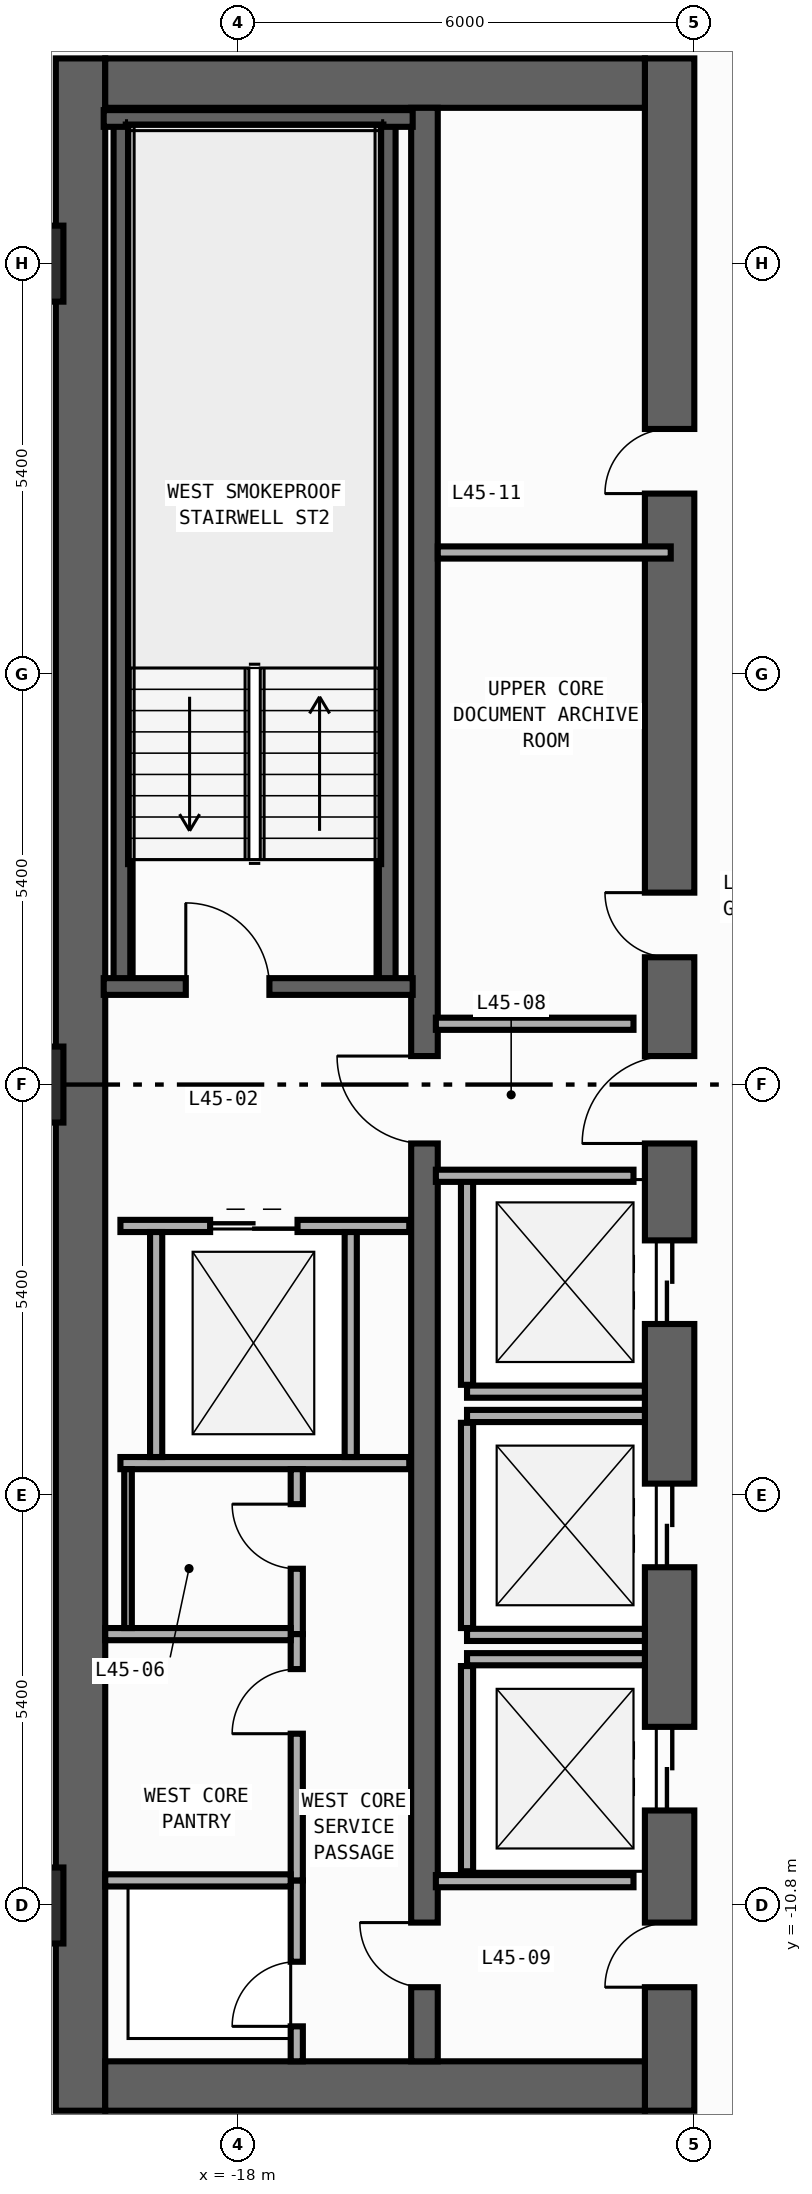
"""IFC4 building model, lengths in metres.
Left out: names, types, materials, properties, quantities, classifications, styles, units other than length and angle.
Written with IfcOpenShell. Run it as: python <this file> out.ifc"""

import sys

from ifc_helpers import new_model, si_unit, direction, frame, frame_2d, origin, origin_2d, place, context, subcontext, project, spatial, rectangle, extrude, element, fill, save


model = new_model("IFC4")
c1 = context("Model", 3, precision=1e-05, world=origin(), true_north=direction((0.0, 1.0)))
c2 = subcontext(c1, "Body", "Model", "MODEL_VIEW")
j1 = project(units=[si_unit("LENGTHUNIT", "METRE"), si_unit("PLANEANGLEUNIT", "RADIAN")], contexts=[c1])
p1 = place(None, origin())
s1 = spatial("IfcSite", under=j1, at=p1, CompositionType="ELEMENT")
p2 = place(p1, origin())
s2 = spatial("IfcBuilding", under=s1, at=p2, CompositionType="ELEMENT")
p3 = place(p2, frame((0.0, 0.0, 195.4)))
s3 = spatial("IfcBuildingStorey", under=s2, at=p3, CompositionType="ELEMENT", Elevation=195.4)
p4 = place(p3, frame((-20.075, -13.5, 0.0), z_axis=(0.0, 0.0, 1.0), x_axis=(0.0, 1.0, 0.0)))
e1 = element("IfcWall", 1, at=p4, inside=s3, PredefinedType="SHEAR", context=c2, shape_type="SweptSolid", body=[
    extrude(rectangle(XDim=27.0, YDim=0.65, at=frame_2d((13.5, 0.0))), origin(), (0.0, 0.0, 1.0), 3.54),
])
p5 = place(p3, frame((-12.325, -13.5, 0.0), z_axis=(0.0, 0.0, 1.0), x_axis=(0.0, 1.0, 0.0)))
e2 = element("IfcWall", 2, at=p5, inside=s3, PredefinedType="SHEAR", context=c2, shape_type="SweptSolid", body=[
    extrude(rectangle(XDim=27.0, YDim=0.65, at=frame_2d((13.5, 0.0))), origin(), (0.0, 0.0, 1.0), 3.54),
])
p6 = place(p5, frame((10.35, 0.0, 0.0)))
e3 = element("IfcOpeningElement", 3, at=p6, cuts=e2, PredefinedType="OPENING", context=c2, shape_type="SweptSolid", body=[
    extrude(rectangle(XDim=1.1, YDim=2.2, at=frame_2d((0.55, 1.1))), frame((0.0, 0.335, 0.0), z_axis=(0.0, -1.0, 0.0), x_axis=(1.0, 0.0, 0.0)), (0.0, 0.0, 1.0), 0.67),
])
p7 = place(p5, frame((7.15, 0.0, 0.0)))
e4 = element("IfcOpeningElement", 4, at=p7, cuts=e2, PredefinedType="OPENING", context=c2, shape_type="SweptSolid", body=[
    extrude(rectangle(XDim=1.1, YDim=2.2, at=frame_2d((0.55, 1.1))), frame((0.0, 0.335, 0.0), z_axis=(0.0, -1.0, 0.0), x_axis=(1.0, 0.0, 0.0)), (0.0, 0.0, 1.0), 0.67),
])
p8 = place(p5, frame((3.95, 0.0, 0.0)))
e5 = element("IfcOpeningElement", 5, at=p8, cuts=e2, PredefinedType="OPENING", context=c2, shape_type="SweptSolid", body=[
    extrude(rectangle(XDim=1.1, YDim=2.2, at=frame_2d((0.55, 1.1))), frame((0.0, 0.335, 0.0), z_axis=(0.0, -1.0, 0.0), x_axis=(1.0, 0.0, 0.0)), (0.0, 0.0, 1.0), 0.67),
])
p9 = place(p5, frame((15.175, 0.0, 0.0)))
e6 = element("IfcOpeningElement", 6, at=p9, cuts=e2, PredefinedType="OPENING", context=c2, shape_type="SweptSolid", body=[
    extrude(rectangle(XDim=0.85, YDim=2.1, at=frame_2d((0.425, 1.05))), frame((0.0, 0.335, 0.0), z_axis=(0.0, -1.0, 0.0), x_axis=(1.0, 0.0, 0.0)), (0.0, 0.0, 1.0), 0.67),
])
p10 = place(p5, frame((21.275, 0.0, 0.0)))
e7 = element("IfcOpeningElement", 7, at=p10, cuts=e2, PredefinedType="OPENING", context=c2, shape_type="SweptSolid", body=[
    extrude(rectangle(XDim=0.85, YDim=2.1, at=frame_2d((0.425, 1.05))), frame((0.0, 0.335, 0.0), z_axis=(0.0, -1.0, 0.0), x_axis=(1.0, 0.0, 0.0)), (0.0, 0.0, 1.0), 0.67),
])
p11 = place(p5, frame((12.725, 0.0, 0.0)))
e8 = element("IfcOpeningElement", 8, at=p11, cuts=e2, PredefinedType="OPENING", context=c2, shape_type="SweptSolid", body=[
    extrude(rectangle(XDim=1.15, YDim=2.2, at=frame_2d((0.575, 1.1))), frame((0.0, 0.335, 0.0), z_axis=(0.0, -1.0, 0.0), x_axis=(1.0, 0.0, 0.0)), (0.0, 0.0, 1.0), 0.67),
])
p12 = place(p5, frame((1.625, 0.0, 0.0)))
e9 = element("IfcOpeningElement", 9, at=p12, cuts=e2, PredefinedType="OPENING", context=c2, shape_type="SweptSolid", body=[
    extrude(rectangle(XDim=0.85, YDim=2.1, at=frame_2d((0.425, 1.05))), frame((0.0, 0.335, 0.0), z_axis=(0.0, -1.0, 0.0), x_axis=(1.0, 0.0, 0.0)), (0.0, 0.0, 1.0), 0.67),
])
for number, where, z_axis, x_axis in (
    (10, (-19.75, -13.175, 0.0), (0.0, 0.0, 1.0), (1.0, 0.0, 0.0)),
    (11, (-19.75, 13.175, 0.0), (0.0, 0.0, 1.0), (1.0, 0.0, 0.0)),
):
    element("IfcWall", number, at=place(p3, frame(where, z_axis=z_axis, x_axis=x_axis)), inside=s3, PredefinedType="SHEAR", context=c2, shape_type="SweptSolid", body=[
        extrude(rectangle(XDim=7.1, YDim=0.65, at=frame_2d((3.55, 0.0))), origin(), (0.0, 0.0, 1.0), 3.54),
    ])
p13 = place(p3, frame((-15.55, -12.85, 0.0), z_axis=(0.0, 0.0, 1.0), x_axis=(0.0, 1.0, 0.0)))
e12 = element("IfcWall", 12, at=p13, inside=s3, PredefinedType="SHEAR", context=c2, shape_type="SweptSolid", body=[
    extrude(rectangle(XDim=25.7, YDim=0.35, at=frame_2d((12.85, 0.0))), origin(), (0.0, 0.0, 1.0), 3.54),
])
p14 = place(p13, frame((12.075, 0.0, 0.0)))
e13 = element("IfcOpeningElement", 13, at=p14, cuts=e12, PredefinedType="OPENING", context=c2, shape_type="SweptSolid", body=[
    extrude(rectangle(XDim=1.15, YDim=2.2, at=frame_2d((0.575, 1.1))), frame((0.0, 0.185, 0.0), z_axis=(0.0, -1.0, 0.0), x_axis=(1.0, 0.0, 0.0)), (0.0, 0.0, 1.0), 0.37),
])
p15 = place(p13, frame((0.975, 0.0, 0.0)))
e14 = element("IfcOpeningElement", 14, at=p15, cuts=e12, PredefinedType="OPENING", context=c2, shape_type="SweptSolid", body=[
    extrude(rectangle(XDim=0.85, YDim=2.1, at=frame_2d((0.425, 1.05))), frame((0.0, 0.185, 0.0), z_axis=(0.0, -1.0, 0.0), x_axis=(1.0, 0.0, 0.0)), (0.0, 0.0, 1.0), 0.37),
])
for number, where, z_axis, x_axis in (
    (15, (-16.04, 1.29, 0.0), (0.0, 0.0, 1.0), (0.0, 1.0, 0.0)),
    (16, (-19.53, 1.29, 0.0), (0.0, 0.0, 1.0), (0.0, 1.0, 0.0)),
):
    element("IfcWall", number, at=place(p3, frame(where, z_axis=z_axis, x_axis=x_axis)), inside=s3, PredefinedType="SHEAR", context=c2, shape_type="SweptSolid", body=[
        extrude(rectangle(XDim=11.42, YDim=0.22, at=frame_2d((5.71, 0.0))), origin(), (0.0, 0.0, 1.0), 3.54),
    ])
p16 = place(p3, frame((-19.77, 12.71, 0.0), z_axis=(0.0, 0.0, 1.0), x_axis=(1.0, 0.0, 0.0)))
e17 = element("IfcWall", 17, at=p16, inside=s3, PredefinedType="SHEAR", context=c2, shape_type="SweptSolid", body=[
    extrude(rectangle(XDim=4.065, YDim=0.22, at=frame_2d((2.032, 0.0))), origin(), (0.0, 0.0, 1.0), 3.54),
])
p17 = place(p3, frame((-19.77, 1.29, 0.0), z_axis=(0.0, 0.0, 1.0), x_axis=(1.0, 0.0, 0.0)))
e18 = element("IfcWall", 18, at=p17, inside=s3, PredefinedType="SHEAR", context=c2, shape_type="SweptSolid", body=[
    extrude(rectangle(XDim=4.065, YDim=0.22, at=frame_2d((2.032, 0.0))), origin(), (0.0, 0.0, 1.0), 3.54),
])
p18 = place(p17, frame((1.08, 0.0, 0.0)))
e19 = element("IfcOpeningElement", 19, at=p18, cuts=e18, PredefinedType="OPENING", context=c2, shape_type="SweptSolid", body=[
    extrude(rectangle(XDim=1.1, YDim=2.2, at=frame_2d((0.55, 1.1))), frame((0.0, 0.12, 0.0), z_axis=(0.0, -1.0, 0.0), x_axis=(1.0, 0.0, 0.0)), (0.0, 0.0, 1.0), 0.24),
])
for number, where, z_axis, x_axis in (
    (20, (-20.8, -10.8, 0.0), (0.0, 0.0, 1.0), (1.0, 0.0, 0.0)),
    (21, (-20.8, 0.0, 0.0), (0.0, 0.0, 1.0), (1.0, 0.0, 0.0)),
    (22, (-20.8, 10.8, 0.0), (0.0, 0.0, 1.0), (1.0, 0.0, 0.0)),
):
    element("IfcColumn", number, at=place(p3, frame(where, z_axis=z_axis, x_axis=x_axis)), inside=s3, PredefinedType="COLUMN", context=c2, shape_type="SweptSolid", body=[
        extrude(rectangle(XDim=1.0, YDim=1.0, at=origin_2d()), origin(), (0.0, 0.0, 1.0), 3.8),
    ])
p19 = place(p3, frame((-14.99, -4.04, 0.0), z_axis=(0.0, 0.0, 1.0), x_axis=(1.0, 0.0, 0.0)))
e23 = element("IfcWall", 23, at=p19, inside=s3, PredefinedType="STANDARD", context=c2, shape_type="SweptSolid", body=[
    extrude(rectangle(XDim=2.34, YDim=0.16, at=frame_2d((1.17, 0.0))), origin(), (0.0, 0.0, 1.0), 3.54),
])
p20 = place(p3, frame((-14.99, -3.95, 0.0), z_axis=(0.0, 0.0, 1.0), x_axis=(0.0, 1.0, 0.0)))
e24 = element("IfcWall", 24, at=p20, inside=s3, PredefinedType="STANDARD", context=c2, shape_type="SweptSolid", body=[
    extrude(rectangle(XDim=2.7, YDim=0.16, at=frame_2d((1.35, 0.0))), origin(), (0.0, 0.0, 1.0), 3.54),
])
for number, where, z_axis, x_axis in (
    (25, (-14.99, -7.24, 0.0), (0.0, 0.0, 1.0), (1.0, 0.0, 0.0)),
    (26, (-14.99, -4.36, 0.0), (0.0, 0.0, 1.0), (1.0, 0.0, 0.0)),
):
    element("IfcWall", number, at=place(p3, frame(where, z_axis=z_axis, x_axis=x_axis)), inside=s3, PredefinedType="STANDARD", context=c2, shape_type="SweptSolid", body=[
        extrude(rectangle(XDim=2.34, YDim=0.16, at=frame_2d((1.17, 0.0))), origin(), (0.0, 0.0, 1.0), 3.54),
    ])
p21 = place(p3, frame((-14.99, -7.15, 0.0), z_axis=(0.0, 0.0, 1.0), x_axis=(0.0, 1.0, 0.0)))
e27 = element("IfcWall", 27, at=p21, inside=s3, PredefinedType="STANDARD", context=c2, shape_type="SweptSolid", body=[
    extrude(rectangle(XDim=2.7, YDim=0.16, at=frame_2d((1.35, 0.0))), origin(), (0.0, 0.0, 1.0), 3.54),
])
p22 = place(p3, frame((-14.99, -7.56, 0.0), z_axis=(0.0, 0.0, 1.0), x_axis=(1.0, 0.0, 0.0)))
e28 = element("IfcWall", 28, at=p22, inside=s3, PredefinedType="STANDARD", context=c2, shape_type="SweptSolid", body=[
    extrude(rectangle(XDim=2.34, YDim=0.16, at=frame_2d((1.17, 0.0))), origin(), (0.0, 0.0, 1.0), 3.54),
])
p23 = place(p3, frame((-14.99, -10.35, 0.0), z_axis=(0.0, 0.0, 1.0), x_axis=(0.0, 1.0, 0.0)))
e29 = element("IfcWall", 29, at=p23, inside=s3, PredefinedType="STANDARD", context=c2, shape_type="SweptSolid", body=[
    extrude(rectangle(XDim=2.7, YDim=0.16, at=frame_2d((1.35, 0.0))), origin(), (0.0, 0.0, 1.0), 3.54),
])
p24 = place(p3, frame((-19.55, -1.86, 0.0), z_axis=(0.0, 0.0, 1.0), x_axis=(1.0, 0.0, 0.0)))
e30 = element("IfcWall", 30, at=p24, inside=s3, PredefinedType="STANDARD", context=c2, shape_type="SweptSolid", body=[
    extrude(rectangle(XDim=3.8, YDim=0.16, at=frame_2d((1.9, 0.0))), origin(), (0.0, 0.0, 1.0), 3.54),
])
p25 = place(p24, frame((1.18, 0.0, 0.0)))
e31 = element("IfcOpeningElement", 31, at=p25, cuts=e30, PredefinedType="OPENING", context=c2, shape_type="SweptSolid", body=[
    extrude(rectangle(XDim=1.15, YDim=2.2, at=frame_2d((0.575, 1.1))), frame((0.0, 0.09, 0.0), z_axis=(0.0, -1.0, 0.0), x_axis=(1.0, 0.0, 0.0)), (0.0, 0.0, 1.0), 0.18),
])
p26 = place(p3, frame((-19.55, -4.98, 0.0), z_axis=(0.0, 0.0, 1.0), x_axis=(1.0, 0.0, 0.0)))
e32 = element("IfcWall", 32, at=p26, inside=s3, PredefinedType="STANDARD", context=c2, shape_type="SweptSolid", body=[
    extrude(rectangle(XDim=3.8, YDim=0.16, at=frame_2d((1.9, 0.0))), origin(), (0.0, 0.0, 1.0), 3.54),
])
for number, where, z_axis, x_axis in (
    (33, (-19.08, -4.9, 0.0), (0.0, 0.0, 1.0), (0.0, 1.0, 0.0)),
    (34, (-16.52, -4.9, 0.0), (0.0, 0.0, 1.0), (0.0, 1.0, 0.0)),
):
    element("IfcWall", number, at=place(p3, frame(where, z_axis=z_axis, x_axis=x_axis)), inside=s3, PredefinedType="STANDARD", context=c2, shape_type="SweptSolid", body=[
        extrude(rectangle(XDim=2.96, YDim=0.16, at=frame_2d((1.48, 0.0))), origin(), (0.0, 0.0, 1.0), 3.54),
    ])
for number, where, z_axis, x_axis in (
    (35, (-15.4, 0.8, 0.0), (0.0, 0.0, 1.0), (1.0, 0.0, 0.0)),
    (36, (-15.4, -1.2, 0.0), (0.0, 0.0, 1.0), (1.0, 0.0, 0.0)),
    (37, (-15.4, -10.48, 0.0), (0.0, 0.0, 1.0), (1.0, 0.0, 0.0)),
):
    element("IfcWall", number, at=place(p3, frame(where, z_axis=z_axis, x_axis=x_axis)), inside=s3, PredefinedType="STANDARD", context=c2, shape_type="SweptSolid", body=[
        extrude(rectangle(XDim=2.6, YDim=0.16, at=frame_2d((1.3, 0.0))), origin(), (0.0, 0.0, 1.0), 3.54),
    ])
p27 = place(p3, frame((-17.23, -12.85, 0.0), z_axis=(0.0, 0.0, 1.0), x_axis=(0.0, 1.0, 0.0)))
e38 = element("IfcWall", 38, at=p27, inside=s3, PredefinedType="PARTITIONING", context=c2, shape_type="SweptSolid", body=[
    extrude(rectangle(XDim=2.38, YDim=0.16, at=frame_2d((1.19, 0.0))), origin(), (0.0, 0.0, 1.0), 3.54),
])
p28 = place(p27, frame((0.46, 0.0, 0.0)))
e39 = element("IfcOpeningElement", 39, at=p28, cuts=e38, PredefinedType="OPENING", context=c2, shape_type="SweptSolid", body=[
    extrude(rectangle(XDim=0.85, YDim=2.1, at=frame_2d((0.425, 1.05))), frame((0.0, 0.09, 0.0), z_axis=(0.0, -1.0, 0.0), x_axis=(1.0, 0.0, 0.0)), (0.0, 0.0, 1.0), 0.18),
])
p29 = place(p3, frame((-17.23, -7.23, 0.0), z_axis=(0.0, 0.0, 1.0), x_axis=(0.0, 1.0, 0.0)))
e40 = element("IfcWall", 40, at=p29, inside=s3, PredefinedType="PARTITIONING", context=c2, shape_type="SweptSolid", body=[
    extrude(rectangle(XDim=2.17, YDim=0.16, at=frame_2d((1.085, 0.0))), origin(), (0.0, 0.0, 1.0), 3.54),
])
p30 = place(p29, frame((0.86, 0.0, 0.0)))
e41 = element("IfcOpeningElement", 41, at=p30, cuts=e40, PredefinedType="OPENING", context=c2, shape_type="SweptSolid", body=[
    extrude(rectangle(XDim=0.85, YDim=2.1, at=frame_2d((0.425, 1.05))), frame((0.0, 0.09, 0.0), z_axis=(0.0, -1.0, 0.0), x_axis=(1.0, 0.0, 0.0)), (0.0, 0.0, 1.0), 0.18),
])
p31 = place(p3, frame((-17.23, -10.47, 0.0), z_axis=(0.0, 0.0, 1.0), x_axis=(0.0, 1.0, 0.0)))
e42 = element("IfcWall", 42, at=p31, inside=s3, PredefinedType="PARTITIONING", context=c2, shape_type="SweptSolid", body=[
    extrude(rectangle(XDim=3.24, YDim=0.16, at=frame_2d((1.62, 0.0))), origin(), (0.0, 0.0, 1.0), 3.54),
])
p32 = place(p31, frame((1.93, 0.0, 0.0)))
e43 = element("IfcOpeningElement", 43, at=p32, cuts=e42, PredefinedType="OPENING", context=c2, shape_type="SweptSolid", body=[
    extrude(rectangle(XDim=0.85, YDim=2.1, at=frame_2d((0.425, 1.05))), frame((0.0, 0.09, 0.0), z_axis=(0.0, -1.0, 0.0), x_axis=(1.0, 0.0, 0.0)), (0.0, 0.0, 1.0), 0.18),
])
for number, where, z_axis, x_axis in (
    (44, (-19.75, -10.47, 0.0), (0.0, 0.0, 1.0), (1.0, 0.0, 0.0)),
    (45, (-19.75, -7.23, 0.0), (0.0, 0.0, 1.0), (1.0, 0.0, 0.0)),
):
    element("IfcWall", number, at=place(p3, frame(where, z_axis=z_axis, x_axis=x_axis)), inside=s3, PredefinedType="PARTITIONING", context=c2, shape_type="SweptSolid", body=[
        extrude(rectangle(XDim=2.44, YDim=0.16, at=frame_2d((1.22, 0.0))), origin(), (0.0, 0.0, 1.0), 3.54),
    ])
p33 = place(p3, frame((-15.375, 7.0, 0.0), z_axis=(0.0, 0.0, 1.0), x_axis=(1.0, 0.0, 0.0)))
e46 = element("IfcWall", 46, at=p33, inside=s3, PredefinedType="PARTITIONING", context=c2, shape_type="SweptSolid", body=[
    extrude(rectangle(XDim=3.065, YDim=0.16, at=frame_2d((1.532, 0.0))), origin(), (0.0, 0.0, 1.0), 3.54),
])
p34 = place(p3, frame((-19.45, -7.15, 0.0), z_axis=(0.0, 0.0, 1.0), x_axis=(0.0, 1.0, 0.0)))
e47 = element("IfcWall", 47, at=p34, inside=s3, PredefinedType="PARTITIONING", context=c2, shape_type="SweptSolid", body=[
    extrude(rectangle(XDim=2.09, YDim=0.1, at=frame_2d((1.045, 0.0))), origin(), (0.0, 0.0, 1.0), 3.54),
])
p35 = place(p18, origin())
e48 = element("IfcDoor", 48, at=p35, inside=s3, OperationType="SINGLE_SWING_LEFT", PredefinedType="DOOR", context=c2, shape_type="SweptSolid", body=[
    extrude(rectangle(XDim=1.1, YDim=2.2, at=frame_2d((0.55, 1.1))), frame((0.0, 0.025, 0.0), z_axis=(0.0, -1.0, 0.0), x_axis=(1.0, 0.0, 0.0)), (0.0, 0.0, 1.0), 0.05),
])
fill(e19, e48)
p36 = place(p6, origin())
e49 = element("IfcDoor", 49, at=p36, inside=s3, OperationType="DOUBLE_DOOR_SLIDING", PredefinedType="DOOR", context=c2, shape_type="SweptSolid", body=[
    extrude(rectangle(XDim=1.1, YDim=2.2, at=frame_2d((0.55, 1.1))), frame((0.0, 0.025, 0.0), z_axis=(0.0, -1.0, 0.0), x_axis=(1.0, 0.0, 0.0)), (0.0, 0.0, 1.0), 0.05),
])
fill(e3, e49)
p37 = place(p7, origin())
e50 = element("IfcDoor", 50, at=p37, inside=s3, OperationType="DOUBLE_DOOR_SLIDING", PredefinedType="DOOR", context=c2, shape_type="SweptSolid", body=[
    extrude(rectangle(XDim=1.1, YDim=2.2, at=frame_2d((0.55, 1.1))), frame((0.0, 0.025, 0.0), z_axis=(0.0, -1.0, 0.0), x_axis=(1.0, 0.0, 0.0)), (0.0, 0.0, 1.0), 0.05),
])
fill(e4, e50)
p38 = place(p8, origin())
e51 = element("IfcDoor", 51, at=p38, inside=s3, OperationType="DOUBLE_DOOR_SLIDING", PredefinedType="DOOR", context=c2, shape_type="SweptSolid", body=[
    extrude(rectangle(XDim=1.1, YDim=2.2, at=frame_2d((0.55, 1.1))), frame((0.0, 0.025, 0.0), z_axis=(0.0, -1.0, 0.0), x_axis=(1.0, 0.0, 0.0)), (0.0, 0.0, 1.0), 0.05),
])
fill(e5, e51)
p39 = place(p9, origin())
e52 = element("IfcDoor", 52, at=p39, inside=s3, OperationType="SINGLE_SWING_RIGHT", PredefinedType="DOOR", context=c2, shape_type="SweptSolid", body=[
    extrude(rectangle(XDim=0.85, YDim=2.1, at=frame_2d((0.425, 1.05))), frame((0.0, 0.025, 0.0), z_axis=(0.0, -1.0, 0.0), x_axis=(1.0, 0.0, 0.0)), (0.0, 0.0, 1.0), 0.05),
])
fill(e6, e52)
p40 = place(p10, origin())
e53 = element("IfcDoor", 53, at=p40, inside=s3, OperationType="SINGLE_SWING_LEFT", PredefinedType="DOOR", context=c2, shape_type="SweptSolid", body=[
    extrude(rectangle(XDim=0.85, YDim=2.1, at=frame_2d((0.425, 1.05))), frame((0.0, 0.025, 0.0), z_axis=(0.0, -1.0, 0.0), x_axis=(1.0, 0.0, 0.0)), (0.0, 0.0, 1.0), 0.05),
])
fill(e7, e53)
p41 = place(p11, origin())
e54 = element("IfcDoor", 54, at=p41, inside=s3, OperationType="SINGLE_SWING_LEFT", PredefinedType="DOOR", context=c2, shape_type="SweptSolid", body=[
    extrude(rectangle(XDim=1.15, YDim=2.2, at=frame_2d((0.575, 1.1))), frame((0.0, 0.025, 0.0), z_axis=(0.0, -1.0, 0.0), x_axis=(1.0, 0.0, 0.0)), (0.0, 0.0, 1.0), 0.05),
])
fill(e8, e54)
p42 = place(p14, origin())
e55 = element("IfcDoor", 55, at=p42, inside=s3, OperationType="SINGLE_SWING_RIGHT", PredefinedType="DOOR", context=c2, shape_type="SweptSolid", body=[
    extrude(rectangle(XDim=1.15, YDim=2.2, at=frame_2d((0.575, 1.1))), frame((0.0, 0.025, 0.0), z_axis=(0.0, -1.0, 0.0), x_axis=(1.0, 0.0, 0.0)), (0.0, 0.0, 1.0), 0.05),
])
fill(e13, e55)
p43 = place(p12, origin())
e56 = element("IfcDoor", 56, at=p43, inside=s3, OperationType="SINGLE_SWING_LEFT", PredefinedType="DOOR", context=c2, shape_type="SweptSolid", body=[
    extrude(rectangle(XDim=0.85, YDim=2.1, at=frame_2d((0.425, 1.05))), frame((0.0, 0.025, 0.0), z_axis=(0.0, -1.0, 0.0), x_axis=(1.0, 0.0, 0.0)), (0.0, 0.0, 1.0), 0.05),
])
fill(e9, e56)
p44 = place(p15, origin())
e57 = element("IfcDoor", 57, at=p44, inside=s3, OperationType="SINGLE_SWING_RIGHT", PredefinedType="DOOR", context=c2, shape_type="SweptSolid", body=[
    extrude(rectangle(XDim=0.85, YDim=2.1, at=frame_2d((0.425, 1.05))), frame((0.0, 0.025, 0.0), z_axis=(0.0, -1.0, 0.0), x_axis=(1.0, 0.0, 0.0)), (0.0, 0.0, 1.0), 0.05),
])
fill(e14, e57)
p45 = place(p25, origin())
e58 = element("IfcDoor", 58, at=p45, inside=s3, OperationType="DOUBLE_DOOR_SLIDING", PredefinedType="DOOR", context=c2, shape_type="SweptSolid", body=[
    extrude(rectangle(XDim=1.15, YDim=2.2, at=frame_2d((0.575, 1.1))), frame((0.0, 0.025, 0.0), z_axis=(0.0, -1.0, 0.0), x_axis=(1.0, 0.0, 0.0)), (0.0, 0.0, 1.0), 0.05),
])
fill(e31, e58)
p46 = place(p28, origin())
e59 = element("IfcDoor", 59, at=p46, inside=s3, OperationType="SINGLE_SWING_LEFT", PredefinedType="DOOR", context=c2, shape_type="SweptSolid", body=[
    extrude(rectangle(XDim=0.85, YDim=2.1, at=frame_2d((0.425, 1.05))), frame((0.0, 0.025, 0.0), z_axis=(0.0, -1.0, 0.0), x_axis=(1.0, 0.0, 0.0)), (0.0, 0.0, 1.0), 0.05),
])
fill(e39, e59)
p47 = place(p30, origin())
e60 = element("IfcDoor", 60, at=p47, inside=s3, OperationType="SINGLE_SWING_RIGHT", PredefinedType="DOOR", context=c2, shape_type="SweptSolid", body=[
    extrude(rectangle(XDim=0.85, YDim=2.1, at=frame_2d((0.425, 1.05))), frame((0.0, 0.025, 0.0), z_axis=(0.0, -1.0, 0.0), x_axis=(1.0, 0.0, 0.0)), (0.0, 0.0, 1.0), 0.05),
])
fill(e41, e60)
p48 = place(p32, origin())
e61 = element("IfcDoor", 61, at=p48, inside=s3, OperationType="SINGLE_SWING_LEFT", PredefinedType="DOOR", context=c2, shape_type="SweptSolid", body=[
    extrude(rectangle(XDim=0.85, YDim=2.1, at=frame_2d((0.425, 1.05))), frame((0.0, 0.025, 0.0), z_axis=(0.0, -1.0, 0.0), x_axis=(1.0, 0.0, 0.0)), (0.0, 0.0, 1.0), 0.05),
])
fill(e43, e61)
save(model, sys.argv[1])
